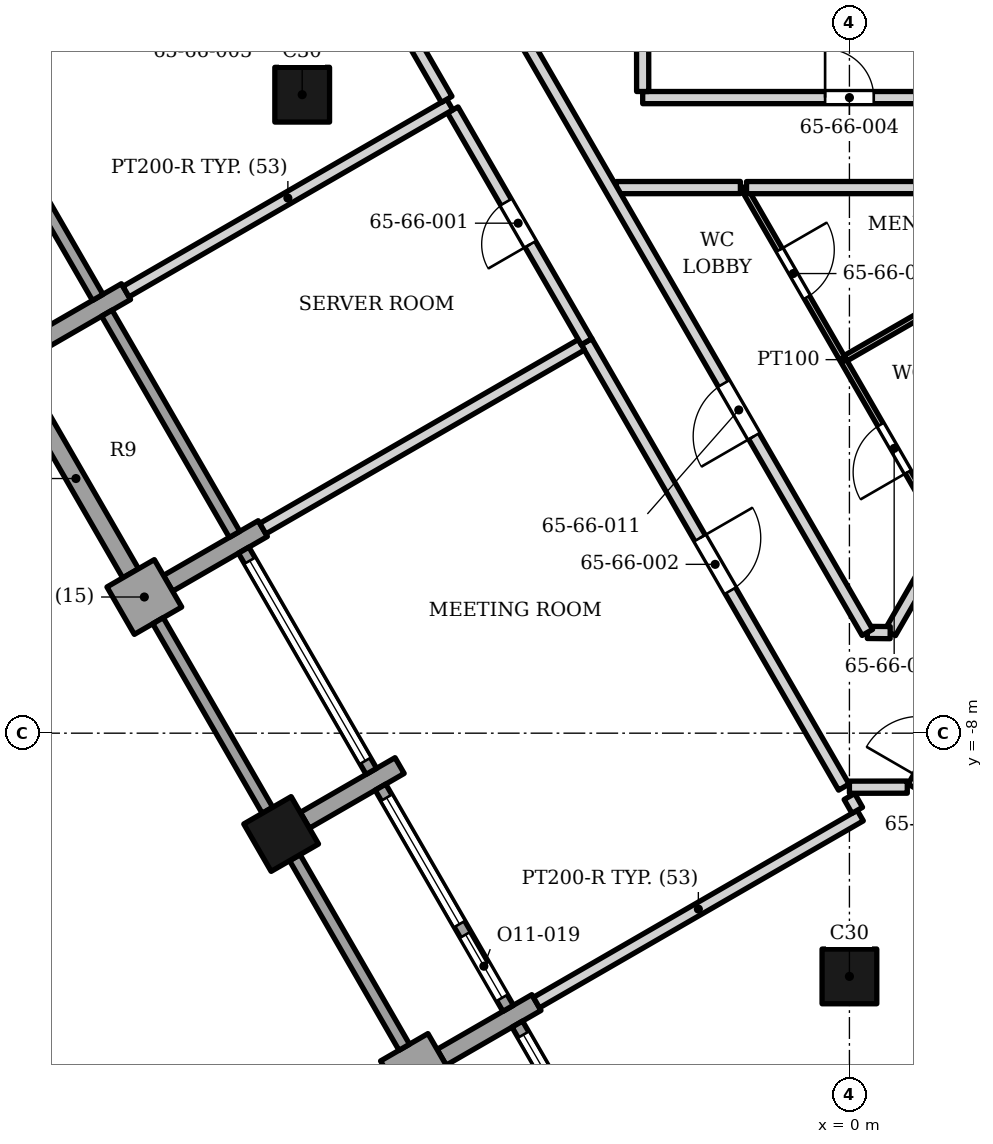
"""IFC4 building model, lengths in metres.
Left out: names, types, materials, properties, quantities, classifications, styles, units other than length and angle.
Written with IfcOpenShell. Run it as: python <this file> out.ifc"""

import sys

from ifc_helpers import new_model, si_unit, direction, frame, frame_2d, origin, origin_2d, place, context, subcontext, project, spatial, rectangle, extrude, element, fill, save


model = new_model("IFC4")
c1 = context("Model", 3, precision=1e-05, world=origin(), true_north=direction((0.0, 1.0)))
c2 = subcontext(c1, "Body", "Model", "MODEL_VIEW")
j1 = project(units=[si_unit("LENGTHUNIT", "METRE"), si_unit("PLANEANGLEUNIT", "RADIAN")], contexts=[c1])
p1 = place(None, origin())
s1 = spatial("IfcSite", under=j1, at=p1, CompositionType="ELEMENT")
p2 = place(p1, origin())
s2 = spatial("IfcBuilding", under=s1, at=p2, CompositionType="ELEMENT")
p3 = place(p2, frame((0.0, 0.0, 271.6)))
s3 = spatial("IfcBuildingStorey", under=s2, at=p3, CompositionType="ELEMENT", Elevation=271.6)
for number, where, z_axis, x_axis in (
    (1, (-9.0, 2.5, 0.0), (0.0, 0.0, 1.0), (1.0, 0.0, 0.0)),
    (2, (0.0, -12.0, 0.0), (0.0, 0.0, 1.0), (1.0, 0.0, 0.0)),
    (3, (-9.346, -9.658, 0.0), (0.0, 0.0, 1.0), (0.5, -0.866, 0.0)),
):
    element("IfcColumn", number, at=place(p3, frame(where, z_axis=z_axis, x_axis=x_axis)), inside=s3, PredefinedType="COLUMN", context=c2, shape_type="SweptSolid", body=[
        extrude(rectangle(XDim=0.9, YDim=0.9, at=origin_2d()), origin(), (0.0, 0.0, 1.0), 3.9),
    ])
p4 = place(p3, frame((-13.457, -1.638, 0.0), z_axis=(0.0, 0.0, 1.0), x_axis=(0.866047807691, 0.499961193289, 0.0)))
e4 = element("IfcWall", 4, at=p4, inside=s3, PredefinedType="SOLIDWALL", context=c2, shape_type="SweptSolid", body=[
    extrude(rectangle(XDim=1.8, YDim=0.3, at=frame_2d((0.9, 0.0))), origin(), (0.0, 0.0, 1.0), 3.0),
])
p5 = place(p3, frame((-11.821, -5.371, 0.0), z_axis=(0.0, 0.0, 1.0), x_axis=(0.499902469156, -0.866081705922, 0.0)))
e5 = element("IfcWall", 5, at=p5, inside=s3, PredefinedType="SOLIDWALL", context=c2, shape_type="SweptSolid", body=[
    extrude(rectangle(XDim=0.9, YDim=0.9, at=frame_2d((0.45, 0.0))), origin(), (0.0, 0.0, 1.0), 3.0),
])
for number, where, z_axis, x_axis in (
    (6, (-11.207, -5.536, 0.0), (0.0, 0.0, 1.0), (0.866, 0.5, 0.0)),
    (7, (-8.957, -9.433, 0.0), (0.0, 0.0, 1.0), (0.866, 0.5, 0.0)),
):
    element("IfcWall", number, at=place(p3, frame(where, z_axis=z_axis, x_axis=x_axis)), inside=s3, PredefinedType="SOLIDWALL", context=c2, shape_type="SweptSolid", body=[
        extrude(rectangle(XDim=1.8, YDim=0.3, at=frame_2d((0.9, 0.0))), origin(), (0.0, 0.0, 1.0), 3.0),
    ])
p6 = place(p3, frame((-7.486, -13.78, 0.0), z_axis=(0.0, 0.0, 1.0), x_axis=(0.866013897511, 0.50001992892, 0.0)))
e8 = element("IfcWall", 8, at=p6, inside=s3, PredefinedType="SOLIDWALL", context=c2, shape_type="SweptSolid", body=[
    extrude(rectangle(XDim=0.9, YDim=0.9, at=frame_2d((0.45, 0.0))), origin(), (0.0, 0.0, 1.0), 3.0),
])
p7 = place(p3, frame((-6.707, -13.33, 0.0), z_axis=(0.0, 0.0, 1.0), x_axis=(0.866047807691, 0.499961193289, 0.0)))
e9 = element("IfcWall", 9, at=p7, inside=s3, PredefinedType="SOLIDWALL", context=c2, shape_type="SweptSolid", body=[
    extrude(rectangle(XDim=1.8, YDim=0.3, at=frame_2d((0.9, 0.0))), origin(), (0.0, 0.0, 1.0), 3.0),
])
p8 = place(p3, frame((-14.462, 2.804, 0.0), z_axis=(0.0, 0.0, 1.0), x_axis=(0.500027713859, -0.866009402589, 0.0)))
e10 = element("IfcWall", 10, at=p8, inside=s3, PredefinedType="ELEMENTEDWALL", context=c2, shape_type="SweptSolid", body=[
    extrude(rectangle(XDim=4.2, YDim=0.2, at=frame_2d((2.1, 0.0))), origin(), (0.0, 0.0, 1.0), 3.0),
])
p9 = place(p3, frame((-11.821, -5.371, 0.0), z_axis=(0.0, 0.0, 1.0), x_axis=(-0.50001992892, 0.866013897511, 0.0)))
e11 = element("IfcWall", 11, at=p9, inside=s3, PredefinedType="SOLIDWALL", context=c2, shape_type="SweptSolid", body=[
    extrude(rectangle(XDim=3.599, YDim=0.3, at=frame_2d((1.8, 0.0))), origin(), (0.0, 0.0, 1.0), 3.0),
])
p10 = place(p3, frame((-12.212, -1.094, 0.0), z_axis=(0.0, 0.0, 1.0), x_axis=(0.500027713859, -0.866009402589, 0.0)))
e12 = element("IfcWall", 12, at=p10, inside=s3, PredefinedType="ELEMENTEDWALL", context=c2, shape_type="SweptSolid", body=[
    extrude(rectangle(XDim=4.2, YDim=0.2, at=frame_2d((2.1, 0.0))), origin(), (0.0, 0.0, 1.0), 3.0),
])
p11 = place(p3, frame((-11.371, -6.15, 0.0), z_axis=(0.0, 0.0, 1.0), x_axis=(0.500012057535, -0.866018442252, 0.0)))
e13 = element("IfcWall", 13, at=p11, inside=s3, PredefinedType="SOLIDWALL", context=c2, shape_type="SweptSolid", body=[
    extrude(rectangle(XDim=3.6, YDim=0.2, at=frame_2d((1.8, 0.0))), origin(), (0.0, 0.0, 1.0), 3.0),
])
p12 = place(p3, frame((-9.962, -4.99, 0.0), z_axis=(0.0, 0.0, 1.0), x_axis=(0.500002543286, -0.866023935413, 0.0)))
e14 = element("IfcWall", 14, at=p12, inside=s3, PredefinedType="ELEMENTEDWALL", context=c2, shape_type="SweptSolid", body=[
    extrude(rectangle(XDim=4.2, YDim=0.2, at=frame_2d((2.1, 0.0))), origin(), (0.0, 0.0, 1.0), 3.0),
])
p13 = place(p12, frame((0.2, 0.0, 0.45)))
e15 = element("IfcOpeningElement", 15, at=p13, cuts=e14, PredefinedType="OPENING", context=c2, shape_type="SweptSolid", body=[
    extrude(rectangle(XDim=3.8, YDim=2.25, at=frame_2d((1.9, 1.125))), frame((0.0, 0.11, 0.0), z_axis=(0.0, -1.0, 0.0), x_axis=(1.0, 0.0, 0.0)), (0.0, 0.0, 1.0), 0.22),
])
p14 = place(p3, frame((-9.121, -10.047, 0.0), z_axis=(0.0, 0.0, 1.0), x_axis=(0.500012057535, -0.866018442252, 0.0)))
e16 = element("IfcWall", 16, at=p14, inside=s3, PredefinedType="SOLIDWALL", context=c2, shape_type="SweptSolid", body=[
    extrude(rectangle(XDim=3.6, YDim=0.2, at=frame_2d((1.8, 0.0))), origin(), (0.0, 0.0, 1.0), 2.95),
])
p15 = place(p3, frame((-7.712, -8.888, 0.0), z_axis=(0.0, 0.0, 1.0), x_axis=(0.500027713859, -0.866009402589, 0.0)))
e17 = element("IfcWall", 17, at=p15, inside=s3, PredefinedType="ELEMENTEDWALL", context=c2, shape_type="SweptSolid", body=[
    extrude(rectangle(XDim=4.2, YDim=0.2, at=frame_2d((2.1, 0.0))), origin(), (0.0, 0.0, 1.0), 2.95),
])
p16 = place(p15, frame((0.2, 0.0, 0.45)))
e18 = element("IfcOpeningElement", 18, at=p16, cuts=e17, PredefinedType="OPENING", context=c2, shape_type="SweptSolid", body=[
    extrude(rectangle(XDim=2.4, YDim=2.25, at=frame_2d((1.2, 1.125))), frame((0.0, 0.11, 0.0), z_axis=(0.0, -1.0, 0.0), x_axis=(1.0, 0.0, 0.0)), (0.0, 0.0, 1.0), 0.22),
])
p17 = place(p15, frame((2.8, 0.0, 0.0)))
e19 = element("IfcOpeningElement", 19, at=p17, cuts=e17, PredefinedType="OPENING", context=c2, shape_type="SweptSolid", body=[
    extrude(rectangle(XDim=1.2, YDim=2.7, at=frame_2d((0.6, 1.35))), frame((0.0, 0.11, 0.0), z_axis=(0.0, -1.0, 0.0), x_axis=(1.0, 0.0, 0.0)), (0.0, 0.0, 1.0), 0.22),
])
p18 = place(p3, frame((-5.462, -12.785, 0.0), z_axis=(0.0, 0.0, 1.0), x_axis=(0.500002543286, -0.866023935413, 0.0)))
e20 = element("IfcWall", 20, at=p18, inside=s3, PredefinedType="ELEMENTEDWALL", context=c2, shape_type="SweptSolid", body=[
    extrude(rectangle(XDim=4.2, YDim=0.2, at=frame_2d((2.1, 0.0))), origin(), (0.0, 0.0, 1.0), 3.0),
])
p19 = place(p18, frame((0.2, 0.0, 0.45)))
e21 = element("IfcOpeningElement", 21, at=p19, cuts=e20, PredefinedType="OPENING", context=c2, shape_type="SweptSolid", body=[
    extrude(rectangle(XDim=3.8, YDim=2.25, at=frame_2d((1.9, 1.125))), frame((0.0, 0.11, 0.0), z_axis=(0.0, -1.0, 0.0), x_axis=(1.0, 0.0, 0.0)), (0.0, 0.0, 1.0), 0.22),
])
p20 = place(p3, frame((-5.147, -12.43, 0.0), z_axis=(0.0, 0.0, 1.0), x_axis=(0.866013692856, 0.500020283374, 0.0)))
e22 = element("IfcWall", 22, at=p20, inside=s3, PredefinedType="PARTITIONING", context=c2, shape_type="SweptSolid", body=[
    extrude(rectangle(XDim=6.15, YDim=0.2, at=frame_2d((3.075, 0.0))), origin(), (0.0, 0.0, 1.0), 2.884),
])
p21 = place(p3, frame((0.0, -9.042, 0.0), z_axis=(0.0, 0.0, 1.0), x_axis=(0.494524249255, -0.869163832024, 0.0)))
e23 = element("IfcWall", 23, at=p21, inside=s3, PredefinedType="PARTITIONING", context=c2, shape_type="SweptSolid", body=[
    extrude(rectangle(XDim=0.261, YDim=0.2, at=frame_2d((0.13, 0.0))), origin(), (0.0, 0.0, 1.0), 2.884),
])
p22 = place(p3, frame((-4.323, -1.562, 0.0), z_axis=(0.0, 0.0, 1.0), x_axis=(0.500177101832, -0.865923129846, 0.0)))
e24 = element("IfcWall", 24, at=p22, inside=s3, PredefinedType="PARTITIONING", context=c2, shape_type="SweptSolid", body=[
    extrude(rectangle(XDim=8.459, YDim=0.2, at=frame_2d((4.23, 0.0))), origin(), (0.0, 0.0, 1.0), 2.884),
])
p23 = place(p22, frame((3.729, 0.0, 0.0)))
e25 = element("IfcOpeningElement", 25, at=p23, cuts=e24, PredefinedType="OPENING", context=c2, shape_type="SweptSolid", body=[
    extrude(rectangle(XDim=1.0, YDim=2.1, at=frame_2d((0.5, 1.05))), frame((0.0, 0.11, 0.0), z_axis=(0.0, -1.0, 0.0), x_axis=(1.0, 0.0, 0.0)), (0.0, 0.0, 1.0), 0.22),
])
p24 = place(p3, frame((0.0, -8.889, 0.0), z_axis=(0.0, 0.0, 1.0), x_axis=(0.999998814747, 0.001539644057, 0.0)))
e26 = element("IfcWall", 26, at=p24, inside=s3, PredefinedType="PARTITIONING", context=c2, shape_type="SweptSolid", body=[
    extrude(rectangle(XDim=0.951, YDim=0.2, at=frame_2d((0.476, 0.0))), origin(), (0.0, 0.0, 1.0), 3.73),
])
p25 = place(p3, frame((1.052, -8.887, 0.0), z_axis=(0.0, 0.0, 1.0), x_axis=(0.500967914192, 0.865465856606, 0.0)))
e27 = element("IfcWall", 27, at=p25, inside=s3, PredefinedType="PARTITIONING", context=c2, shape_type="SweptSolid", body=[
    extrude(rectangle(XDim=1.408, YDim=0.2, at=frame_2d((0.704, 0.0))), origin(), (0.0, 0.0, 1.0), 3.73),
])
p26 = place(p25, frame((0.188, 0.0, 0.0)))
e28 = element("IfcOpeningElement", 28, at=p26, cuts=e27, PredefinedType="OPENING", context=c2, shape_type="SweptSolid", body=[
    extrude(rectangle(XDim=1.0, YDim=2.1, at=frame_2d((0.5, 1.05))), frame((0.0, 0.11, 0.0), z_axis=(0.0, -1.0, 0.0), x_axis=(1.0, 0.0, 0.0)), (0.0, 0.0, 1.0), 0.22),
])
p27 = place(p3, frame((0.67, -6.346, 0.0), z_axis=(0.0, 0.0, 1.0), x_axis=(0.499143893265, 0.866519113359, 0.0)))
e29 = element("IfcWall", 29, at=p27, inside=s3, PredefinedType="PARTITIONING", context=c2, shape_type="SweptSolid", body=[
    extrude(rectangle(XDim=8.452, YDim=0.2, at=frame_2d((4.226, 0.0))), origin(), (0.0, 0.0, 1.0), 2.884),
])
p28 = place(p3, frame((0.295, -6.343, 0.0), z_axis=(0.0, 0.0, 1.0), x_axis=(0.999958464773, -0.009114204757, 0.0)))
e30 = element("IfcWall", 30, at=p28, inside=s3, PredefinedType="PARTITIONING", context=c2, shape_type="SweptSolid", body=[
    extrude(rectangle(XDim=0.375, YDim=0.2, at=frame_2d((0.188, 0.0))), origin(), (0.0, 0.0, 1.0), 3.73),
])
p29 = place(p3, frame((-9.648, -4.636, 0.0), z_axis=(0.0, 0.0, 1.0), x_axis=(0.866169461704, 0.499750401311, 0.0)))
e31 = element("IfcWall", 31, at=p29, inside=s3, PredefinedType="PARTITIONING", context=c2, shape_type="SweptSolid", body=[
    extrude(rectangle(XDim=6.05, YDim=0.2, at=frame_2d((3.025, 0.0))), origin(), (0.0, 0.0, 1.0), 2.884),
])
p30 = place(p3, frame((-6.523, 2.249, 0.0), z_axis=(0.0, 0.0, 1.0), x_axis=(0.50001224981, -0.866018331238, 0.0)))
e32 = element("IfcWall", 32, at=p30, inside=s3, PredefinedType="PARTITIONING", context=c2, shape_type="SweptSolid", body=[
    extrude(rectangle(XDim=4.4, YDim=0.2, at=frame_2d((2.2, 0.0))), origin(), (0.0, 0.0, 1.0), 2.884),
])
p31 = place(p30, frame((1.75, 0.0, 0.0)))
e33 = element("IfcOpeningElement", 33, at=p31, cuts=e32, PredefinedType="OPENING", context=c2, shape_type="SweptSolid", body=[
    extrude(rectangle(XDim=0.8, YDim=2.1, at=frame_2d((0.4, 1.05))), frame((0.0, 0.11, 0.0), z_axis=(0.0, -1.0, 0.0), x_axis=(1.0, 0.0, 0.0)), (0.0, 0.0, 1.0), 0.22),
])
p32 = place(p3, frame((-11.898, -0.738, 0.0), z_axis=(0.0, 0.0, 1.0), x_axis=(0.865915132248, 0.500190947283, 0.0)))
e34 = element("IfcWall", 34, at=p32, inside=s3, PredefinedType="PARTITIONING", context=c2, shape_type="SweptSolid", body=[
    extrude(rectangle(XDim=6.149, YDim=0.2, at=frame_2d((3.075, 0.0))), origin(), (0.0, 0.0, 1.0), 3.128),
])
p33 = place(p3, frame((-0.062, -1.834, 0.0), z_axis=(0.0, 0.0, 1.0), x_axis=(0.865950314505, 0.5001300359, 0.0)))
e35 = element("IfcWall", 35, at=p33, inside=s3, PredefinedType="PARTITIONING", context=c2, shape_type="SweptSolid", body=[
    extrude(rectangle(XDim=5.513, YDim=0.1, at=frame_2d((2.757, 0.0))), origin(), (0.0, 0.0, 1.0), 2.884),
])
p34 = place(p3, frame((-3.834, 0.972, 0.0), z_axis=(0.0, 0.0, 1.0), x_axis=(0.999999742389, 0.000717789024, 0.0)))
e36 = element("IfcWall", 36, at=p34, inside=s3, PredefinedType="PARTITIONING", context=c2, shape_type="SweptSolid", body=[
    extrude(rectangle(XDim=2.041, YDim=0.2, at=frame_2d((1.021, 0.0))), origin(), (0.0, 0.0, 1.0), 3.73),
])
p35 = place(p3, frame((-1.741, 0.974, 0.0), z_axis=(0.0, 0.0, 1.0), x_axis=(0.499978916304, -0.86603757612, 0.0)))
e37 = element("IfcWall", 37, at=p35, inside=s3, PredefinedType="PARTITIONING", context=c2, shape_type="SweptSolid", body=[
    extrude(rectangle(XDim=6.537, YDim=0.1, at=frame_2d((3.269, 0.0))), origin(), (0.0, 0.0, 1.0), 2.884),
])
p36 = place(p35, frame((1.184, 0.0, 0.0)))
e38 = element("IfcOpeningElement", 38, at=p36, cuts=e37, PredefinedType="OPENING", context=c2, shape_type="SweptSolid", body=[
    extrude(rectangle(XDim=0.9, YDim=2.1, at=frame_2d((0.45, 1.05))), frame((0.0, 0.06, 0.0), z_axis=(0.0, -1.0, 0.0), x_axis=(1.0, 0.0, 0.0)), (0.0, 0.0, 1.0), 0.12),
])
p37 = place(p35, frame((4.504, 0.0, 0.0)))
e39 = element("IfcOpeningElement", 39, at=p37, cuts=e37, PredefinedType="OPENING", context=c2, shape_type="SweptSolid", body=[
    extrude(rectangle(XDim=0.9, YDim=2.1, at=frame_2d((0.45, 1.05))), frame((0.0, 0.06, 0.0), z_axis=(0.0, -1.0, 0.0), x_axis=(1.0, 0.0, 0.0)), (0.0, 0.0, 1.0), 0.12),
])
p38 = place(p3, frame((-1.692, 0.972, 0.0), z_axis=(0.0, 0.0, 1.0), x_axis=(0.999999954692, 0.000301023466, 0.0)))
e40 = element("IfcWall", 40, at=p38, inside=s3, PredefinedType="PARTITIONING", context=c2, shape_type="SweptSolid", body=[
    extrude(rectangle(XDim=6.488, YDim=0.2, at=frame_2d((3.244, 0.0))), origin(), (0.0, 0.0, 1.0), 3.73),
])
p39 = place(p3, frame((-7.271, 3.546, 0.0), z_axis=(0.0, 0.0, 1.0), x_axis=(0.499075838414, -0.866558311663, 0.0)))
e41 = element("IfcWall", 41, at=p39, inside=s3, PredefinedType="PARTITIONING", context=c2, shape_type="SweptSolid", body=[
    extrude(rectangle(XDim=1.297, YDim=0.2, at=frame_2d((0.648, 0.0))), origin(), (0.0, 0.0, 1.0), 3.73),
])
p40 = place(p3, frame((-3.4, 2.452, 0.0), z_axis=(0.0, 0.0, 1.0), x_axis=(1.0, 0.0, 0.0)))
e42 = element("IfcWall", 42, at=p40, inside=s3, PredefinedType="PARTITIONING", context=c2, shape_type="SweptSolid", body=[
    extrude(rectangle(XDim=6.8, YDim=0.2, at=frame_2d((3.4, 0.0))), origin(), (0.0, 0.0, 1.0), 2.884),
])
p41 = place(p40, frame((3.0, 0.0, 0.0)))
e43 = element("IfcOpeningElement", 43, at=p41, cuts=e42, PredefinedType="OPENING", context=c2, shape_type="SweptSolid", body=[
    extrude(rectangle(XDim=0.8, YDim=2.1, at=frame_2d((0.4, 1.05))), frame((0.0, 0.11, 0.0), z_axis=(0.0, -1.0, 0.0), x_axis=(1.0, 0.0, 0.0)), (0.0, 0.0, 1.0), 0.22),
])
p42 = place(p3, frame((-3.402, 4.25, 0.0), z_axis=(0.0, 0.0, 1.0), x_axis=(0.001150250857, -0.999999338461, 0.0)))
e44 = element("IfcWall", 44, at=p42, inside=s3, PredefinedType="PARTITIONING", context=c2, shape_type="SweptSolid", body=[
    extrude(rectangle(XDim=1.698, YDim=0.2, at=frame_2d((0.849, 0.0))), origin(), (0.0, 0.0, 1.0), 3.73),
])
p43 = place(p3, frame((-5.433, 3.565, 0.0), z_axis=(0.0, 0.0, 1.0), x_axis=(0.500524932541, -0.865722121644, 0.0)))
e45 = element("IfcWall", 45, at=p43, inside=s3, PredefinedType="PARTITIONING", context=c2, shape_type="SweptSolid", body=[
    extrude(rectangle(XDim=11.445, YDim=0.2, at=frame_2d((5.723, 0.0))), origin(), (0.0, 0.0, 1.0), 2.884),
])
p44 = place(p43, frame((6.719, 0.0, 0.0)))
e46 = element("IfcOpeningElement", 46, at=p44, cuts=e45, PredefinedType="OPENING", context=c2, shape_type="SweptSolid", body=[
    extrude(rectangle(XDim=1.0, YDim=2.1, at=frame_2d((0.5, 1.05))), frame((0.0, 0.11, 0.0), z_axis=(0.0, -1.0, 0.0), x_axis=(1.0, 0.0, 0.0)), (0.0, 0.0, 1.0), 0.22),
])
p45 = place(p13, origin())
e47 = element("IfcWindow", 47, at=p45, inside=s3, PartitioningType="SINGLE_PANEL", PredefinedType="WINDOW", context=c2, shape_type="SweptSolid", body=[
    extrude(rectangle(XDim=3.8, YDim=2.25, at=frame_2d((1.9, 1.125))), frame((0.0, 0.03, 0.0), z_axis=(0.0, -1.0, 0.0), x_axis=(1.0, 0.0, 0.0)), (0.0, 0.0, 1.0), 0.06),
])
fill(e15, e47)
p46 = place(p16, origin())
e48 = element("IfcWindow", 48, at=p46, inside=s3, PartitioningType="SINGLE_PANEL", PredefinedType="WINDOW", context=c2, shape_type="SweptSolid", body=[
    extrude(rectangle(XDim=2.4, YDim=2.25, at=frame_2d((1.2, 1.125))), frame((0.0, 0.03, 0.0), z_axis=(0.0, -1.0, 0.0), x_axis=(1.0, 0.0, 0.0)), (0.0, 0.0, 1.0), 0.06),
])
fill(e18, e48)
p47 = place(p17, origin())
e49 = element("IfcDoor", 49, at=p47, inside=s3, OperationType="SINGLE_SWING_LEFT", PredefinedType="DOOR", context=c2, shape_type="SweptSolid", body=[
    extrude(rectangle(XDim=1.2, YDim=2.7, at=frame_2d((0.6, 1.35))), frame((0.0, 0.025, 0.0), z_axis=(0.0, -1.0, 0.0), x_axis=(1.0, 0.0, 0.0)), (0.0, 0.0, 1.0), 0.05),
])
fill(e19, e49)
p48 = place(p19, origin())
e50 = element("IfcWindow", 50, at=p48, inside=s3, PartitioningType="SINGLE_PANEL", PredefinedType="WINDOW", context=c2, shape_type="SweptSolid", body=[
    extrude(rectangle(XDim=3.8, YDim=2.25, at=frame_2d((1.9, 1.125))), frame((0.0, 0.03, 0.0), z_axis=(0.0, -1.0, 0.0), x_axis=(1.0, 0.0, 0.0)), (0.0, 0.0, 1.0), 0.06),
])
fill(e21, e50)
p49 = place(p31, origin())
e51 = element("IfcDoor", 51, at=p49, inside=s3, OperationType="SINGLE_SWING_RIGHT", PredefinedType="DOOR", context=c2, shape_type="SweptSolid", body=[
    extrude(rectangle(XDim=0.8, YDim=2.1, at=frame_2d((0.4, 1.05))), frame((0.0, 0.025, 0.0), z_axis=(0.0, -1.0, 0.0), x_axis=(1.0, 0.0, 0.0)), (0.0, 0.0, 1.0), 0.05),
])
fill(e33, e51)
p50 = place(p23, origin())
e52 = element("IfcDoor", 52, at=p50, inside=s3, OperationType="SINGLE_SWING_LEFT", PredefinedType="DOOR", context=c2, shape_type="SweptSolid", body=[
    extrude(rectangle(XDim=1.0, YDim=2.1, at=frame_2d((0.5, 1.05))), frame((0.0, 0.025, 0.0), z_axis=(0.0, -1.0, 0.0), x_axis=(1.0, 0.0, 0.0)), (0.0, 0.0, 1.0), 0.05),
])
fill(e25, e52)
p51 = place(p41, origin())
e53 = element("IfcDoor", 53, at=p51, inside=s3, OperationType="SINGLE_SWING_LEFT", PredefinedType="DOOR", context=c2, shape_type="SweptSolid", body=[
    extrude(rectangle(XDim=0.8, YDim=2.1, at=frame_2d((0.4, 1.05))), frame((0.0, 0.025, 0.0), z_axis=(0.0, -1.0, 0.0), x_axis=(1.0, 0.0, 0.0)), (0.0, 0.0, 1.0), 0.05),
])
fill(e43, e53)
p52 = place(p44, origin())
e54 = element("IfcDoor", 54, at=p52, inside=s3, OperationType="SINGLE_SWING_RIGHT", PredefinedType="DOOR", context=c2, shape_type="SweptSolid", body=[
    extrude(rectangle(XDim=1.0, YDim=2.1, at=frame_2d((0.5, 1.05))), frame((0.0, 0.025, 0.0), z_axis=(0.0, -1.0, 0.0), x_axis=(1.0, 0.0, 0.0)), (0.0, 0.0, 1.0), 0.05),
])
fill(e46, e54)
p53 = place(p36, origin())
e55 = element("IfcDoor", 55, at=p53, inside=s3, OperationType="SINGLE_SWING_LEFT", PredefinedType="DOOR", context=c2, shape_type="SweptSolid", body=[
    extrude(rectangle(XDim=0.9, YDim=2.1, at=frame_2d((0.45, 1.05))), frame((0.0, 0.025, 0.0), z_axis=(0.0, -1.0, 0.0), x_axis=(1.0, 0.0, 0.0)), (0.0, 0.0, 1.0), 0.05),
])
fill(e38, e55)
p54 = place(p37, origin())
e56 = element("IfcDoor", 56, at=p54, inside=s3, OperationType="SINGLE_SWING_RIGHT", PredefinedType="DOOR", context=c2, shape_type="SweptSolid", body=[
    extrude(rectangle(XDim=0.9, YDim=2.1, at=frame_2d((0.45, 1.05))), frame((0.0, 0.025, 0.0), z_axis=(0.0, -1.0, 0.0), x_axis=(1.0, 0.0, 0.0)), (0.0, 0.0, 1.0), 0.05),
])
fill(e39, e56)
save(model, sys.argv[1])
